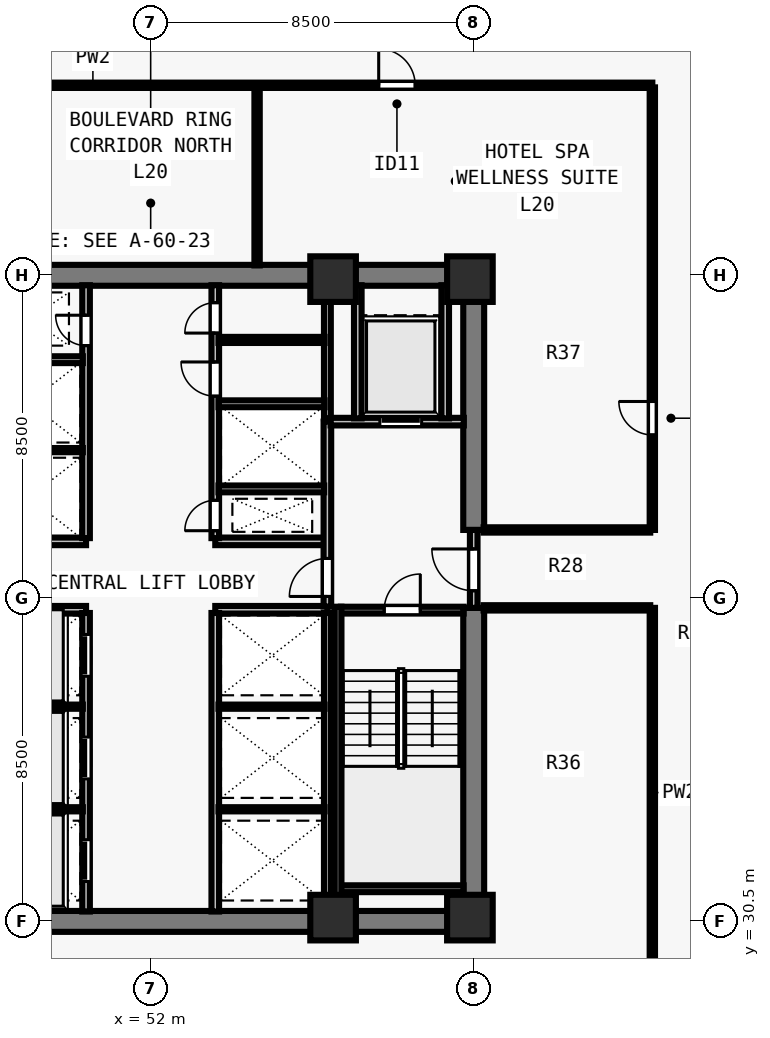
"""IFC4 building model, lengths in metres.
Left out: names, types, materials, properties, quantities, classifications, styles, units other than length and angle.
Written with IfcOpenShell. Run it as: python <this file> out.ifc"""

import sys

from ifc_helpers import new_model, si_unit, direction, frame, frame_2d, origin, origin_2d, place, context, subcontext, project, spatial, rectangle, extrude, element, fill, save


model = new_model("IFC4")
c1 = context("Model", 3, precision=1e-05, world=origin(), true_north=direction((0.0, 1.0)))
c2 = subcontext(c1, "Body", "Model", "MODEL_VIEW")
j1 = project(units=[si_unit("LENGTHUNIT", "METRE"), si_unit("PLANEANGLEUNIT", "RADIAN")], contexts=[c1])
p1 = place(None, origin())
s1 = spatial("IfcSite", under=j1, at=p1, CompositionType="ELEMENT")
p2 = place(p1, origin())
s2 = spatial("IfcBuilding", under=s1, at=p2, CompositionType="ELEMENT")
p3 = place(p2, frame((0.0, 0.0, 76.0)))
s3 = spatial("IfcBuildingStorey", under=s2, at=p3, CompositionType="ELEMENT", Elevation=76.0)
for number, where, z_axis, x_axis in (
    (1, (56.8, 30.6, 0.0), (0.0, 0.0, 1.0), (1.0, 0.0, 0.0)),
    (2, (60.4, 30.6, 0.0), (0.0, 0.0, 1.0), (1.0, 0.0, 0.0)),
    (3, (56.8, 47.4, 0.0), (0.0, 0.0, 1.0), (1.0, 0.0, 0.0)),
    (4, (60.4, 47.4, 0.0), (0.0, 0.0, 1.0), (1.0, 0.0, 0.0)),
):
    element("IfcColumn", number, at=place(p3, frame(where, z_axis=z_axis, x_axis=x_axis)), inside=s3, PredefinedType="COLUMN", context=c2, shape_type="SweptSolid", body=[
        extrude(rectangle(XDim=1.2, YDim=1.2, at=origin_2d()), origin(), (0.0, 0.0, 1.0), 3.5),
    ])
for number, where, z_axis, x_axis in (
    (5, (43.225, 30.5, 0.0), (0.0, 0.0, 1.0), (1.0, 0.0, 0.0)),
    (6, (43.225, 47.5, 0.0), (0.0, 0.0, 1.0), (1.0, 0.0, 0.0)),
):
    element("IfcWall", number, at=place(p3, frame(where, z_axis=z_axis, x_axis=x_axis)), inside=s3, PredefinedType="SHEAR", context=c2, shape_type="SweptSolid", body=[
        extrude(rectangle(XDim=17.55, YDim=0.55, at=frame_2d((8.775, 0.0))), origin(), (0.0, 0.0, 1.0), 3.28),
    ])
p4 = place(p3, frame((60.5, 30.765, 0.0), z_axis=(0.0, 0.0, 1.0), x_axis=(0.0, 1.0, 0.0)))
e7 = element("IfcWall", 7, at=p4, inside=s3, PredefinedType="SHEAR", context=c2, shape_type="SweptSolid", body=[
    extrude(rectangle(XDim=7.985, YDim=0.55, at=frame_2d((3.993, 0.0))), origin(), (0.0, 0.0, 1.0), 3.28),
])
p5 = place(p3, frame((60.5, 40.8, 0.0), z_axis=(0.0, 0.0, 1.0), x_axis=(0.0, 1.0, 0.0)))
e8 = element("IfcWall", 8, at=p5, inside=s3, PredefinedType="SHEAR", context=c2, shape_type="SweptSolid", body=[
    extrude(rectangle(XDim=6.435, YDim=0.55, at=frame_2d((3.218, 0.0))), origin(), (0.0, 0.0, 1.0), 3.28),
])
for number, where, z_axis, x_axis in (
    (9, (47.35, 38.7, 0.0), (0.0, 0.0, 1.0), (1.0, 0.0, 0.0)),
    (10, (47.35, 40.5, 0.0), (0.0, 0.0, 1.0), (1.0, 0.0, 0.0)),
    (11, (53.7, 38.7, 0.0), (0.0, 0.0, 1.0), (1.0, 0.0, 0.0)),
    (12, (53.7, 40.5, 0.0), (0.0, 0.0, 1.0), (1.0, 0.0, 0.0)),
):
    element("IfcWall", number, at=place(p3, frame(where, z_axis=z_axis, x_axis=x_axis)), inside=s3, PredefinedType="SOLIDWALL", context=c2, shape_type="SweptSolid", body=[
        extrude(rectangle(XDim=2.95, YDim=0.2, at=frame_2d((1.475, 0.0))), origin(), (0.0, 0.0, 1.0), 3.28),
    ])
p6 = place(p3, frame((50.3, 30.76, 0.0), z_axis=(0.0, 0.0, 1.0), x_axis=(0.0, 1.0, 0.0)))
e13 = element("IfcWall", 13, at=p6, inside=s3, PredefinedType="SOLIDWALL", context=c2, shape_type="SweptSolid", body=[
    extrude(rectangle(XDim=7.855, YDim=0.2, at=frame_2d((3.927, 0.0))), origin(), (0.0, 0.0, 1.0), 3.28),
])
p7 = place(p6, frame((0.79, 0.0, 0.0)))
e14 = element("IfcOpeningElement", 14, at=p7, cuts=e13, PredefinedType="OPENING", context=c2, shape_type="SweptSolid", body=[
    extrude(rectangle(XDim=1.1, YDim=2.2, at=frame_2d((0.55, 1.1))), frame((0.0, 0.11, 0.0), z_axis=(0.0, -1.0, 0.0), x_axis=(1.0, 0.0, 0.0)), (0.0, 0.0, 1.0), 0.22),
])
p8 = place(p6, frame((3.49, 0.0, 0.0)))
e15 = element("IfcOpeningElement", 15, at=p8, cuts=e13, PredefinedType="OPENING", context=c2, shape_type="SweptSolid", body=[
    extrude(rectangle(XDim=1.1, YDim=2.2, at=frame_2d((0.55, 1.1))), frame((0.0, 0.11, 0.0), z_axis=(0.0, -1.0, 0.0), x_axis=(1.0, 0.0, 0.0)), (0.0, 0.0, 1.0), 0.22),
])
p9 = place(p6, frame((6.19, 0.0, 0.0)))
e16 = element("IfcOpeningElement", 16, at=p9, cuts=e13, PredefinedType="OPENING", context=c2, shape_type="SweptSolid", body=[
    extrude(rectangle(XDim=1.1, YDim=2.2, at=frame_2d((0.55, 1.1))), frame((0.0, 0.11, 0.0), z_axis=(0.0, -1.0, 0.0), x_axis=(1.0, 0.0, 0.0)), (0.0, 0.0, 1.0), 0.22),
])
p10 = place(p3, frame((53.7, 30.76, 0.0), z_axis=(0.0, 0.0, 1.0), x_axis=(0.0, 1.0, 0.0)))
e17 = element("IfcWall", 17, at=p10, inside=s3, PredefinedType="SOLIDWALL", context=c2, shape_type="SweptSolid", body=[
    extrude(rectangle(XDim=7.855, YDim=0.2, at=frame_2d((3.927, 0.0))), origin(), (0.0, 0.0, 1.0), 3.28),
])
p11 = place(p3, frame((50.3, 40.585, 0.0), z_axis=(0.0, 0.0, 1.0), x_axis=(0.0, 1.0, 0.0)))
e18 = element("IfcWall", 18, at=p11, inside=s3, PredefinedType="SOLIDWALL", context=c2, shape_type="SweptSolid", body=[
    extrude(rectangle(XDim=6.655, YDim=0.2, at=frame_2d((3.328, 0.0))), origin(), (0.0, 0.0, 1.0), 3.28),
])
p12 = place(p11, frame((5.065, 0.0, 0.0)))
e19 = element("IfcOpeningElement", 19, at=p12, cuts=e18, PredefinedType="OPENING", context=c2, shape_type="SweptSolid", body=[
    extrude(rectangle(XDim=0.8, YDim=2.08, at=frame_2d((0.4, 1.04))), frame((0.0, 0.11, 0.0), z_axis=(0.0, -1.0, 0.0), x_axis=(1.0, 0.0, 0.0)), (0.0, 0.0, 1.0), 0.22),
])
p13 = place(p3, frame((53.7, 40.585, 0.0), z_axis=(0.0, 0.0, 1.0), x_axis=(0.0, 1.0, 0.0)))
e20 = element("IfcWall", 20, at=p13, inside=s3, PredefinedType="SOLIDWALL", context=c2, shape_type="SweptSolid", body=[
    extrude(rectangle(XDim=6.655, YDim=0.2, at=frame_2d((3.328, 0.0))), origin(), (0.0, 0.0, 1.0), 3.28),
])
p14 = place(p13, frame((0.195, 0.0, 0.0)))
e21 = element("IfcOpeningElement", 21, at=p14, cuts=e20, PredefinedType="OPENING", context=c2, shape_type="SweptSolid", body=[
    extrude(rectangle(XDim=0.8, YDim=2.08, at=frame_2d((0.4, 1.04))), frame((0.0, 0.11, 0.0), z_axis=(0.0, -1.0, 0.0), x_axis=(1.0, 0.0, 0.0)), (0.0, 0.0, 1.0), 0.22),
])
p15 = place(p13, frame((3.735, 0.0, 0.0)))
e22 = element("IfcOpeningElement", 22, at=p15, cuts=e20, PredefinedType="OPENING", context=c2, shape_type="SweptSolid", body=[
    extrude(rectangle(XDim=0.9, YDim=2.12, at=frame_2d((0.45, 1.06))), frame((0.0, 0.11, 0.0), z_axis=(0.0, -1.0, 0.0), x_axis=(1.0, 0.0, 0.0)), (0.0, 0.0, 1.0), 0.22),
])
p16 = place(p13, frame((5.395, 0.0, 0.0)))
e23 = element("IfcOpeningElement", 23, at=p16, cuts=e20, PredefinedType="OPENING", context=c2, shape_type="SweptSolid", body=[
    extrude(rectangle(XDim=0.8, YDim=2.1, at=frame_2d((0.4, 1.05))), frame((0.0, 0.11, 0.0), z_axis=(0.0, -1.0, 0.0), x_axis=(1.0, 0.0, 0.0)), (0.0, 0.0, 1.0), 0.22),
])
p17 = place(p3, frame((60.5, 38.75, 0.0), z_axis=(0.0, 0.0, 1.0), x_axis=(0.0, 1.0, 0.0)))
e24 = element("IfcWall", 24, at=p17, inside=s3, PredefinedType="SOLIDWALL", context=c2, shape_type="SweptSolid", body=[
    extrude(rectangle(XDim=2.05, YDim=0.2, at=frame_2d((1.025, 0.0))), origin(), (0.0, 0.0, 1.0), 3.28),
])
p18 = place(p17, frame((0.45, 0.0, 0.0)))
e25 = element("IfcOpeningElement", 25, at=p18, cuts=e24, PredefinedType="OPENING", context=c2, shape_type="SweptSolid", body=[
    extrude(rectangle(XDim=1.1, YDim=2.15, at=frame_2d((0.55, 1.075))), frame((0.0, 0.11, 0.0), z_axis=(0.0, -1.0, 0.0), x_axis=(1.0, 0.0, 0.0)), (0.0, 0.0, 1.0), 0.22),
])
p19 = place(p3, frame((56.65, 38.785, 0.0), z_axis=(0.0, 0.0, 1.0), x_axis=(0.0, 1.0, 0.0)))
e26 = element("IfcWall", 26, at=p19, inside=s3, PredefinedType="SOLIDWALL", context=c2, shape_type="SweptSolid", body=[
    extrude(rectangle(XDim=4.865, YDim=0.2, at=frame_2d((2.433, 0.0))), origin(), (0.0, 0.0, 1.0), 3.28),
])
p20 = place(p19, frame((0.265, 0.0, 0.0)))
e27 = element("IfcOpeningElement", 27, at=p20, cuts=e26, PredefinedType="OPENING", context=c2, shape_type="SweptSolid", body=[
    extrude(rectangle(XDim=1.0, YDim=2.15, at=frame_2d((0.5, 1.075))), frame((0.0, 0.11, 0.0), z_axis=(0.0, -1.0, 0.0), x_axis=(1.0, 0.0, 0.0)), (0.0, 0.0, 1.0), 0.22),
])
p21 = place(p3, frame((56.735, 43.65, 0.0), z_axis=(0.0, 0.0, 1.0), x_axis=(1.0, 0.0, 0.0)))
e28 = element("IfcWall", 28, at=p21, inside=s3, PredefinedType="SOLIDWALL", context=c2, shape_type="SweptSolid", body=[
    extrude(rectangle(XDim=3.505, YDim=0.2, at=frame_2d((1.752, 0.0))), origin(), (0.0, 0.0, 1.0), 3.28),
])
p22 = place(p21, frame((1.295, 0.0, 0.0)))
e29 = element("IfcOpeningElement", 29, at=p22, cuts=e28, PredefinedType="OPENING", context=c2, shape_type="SweptSolid", body=[
    extrude(rectangle(XDim=1.1, YDim=2.2, at=frame_2d((0.55, 1.1))), frame((0.0, 0.11, 0.0), z_axis=(0.0, -1.0, 0.0), x_axis=(1.0, 0.0, 0.0)), (0.0, 0.0, 1.0), 0.22),
])
for number, where, z_axis, x_axis in (
    (30, (57.45, 43.735, 0.0), (0.0, 0.0, 1.0), (0.0, 1.0, 0.0)),
    (31, (59.75, 43.735, 0.0), (0.0, 0.0, 1.0), (0.0, 1.0, 0.0)),
):
    element("IfcWall", number, at=place(p3, frame(where, z_axis=z_axis, x_axis=x_axis)), inside=s3, PredefinedType="SOLIDWALL", context=c2, shape_type="SweptSolid", body=[
        extrude(rectangle(XDim=3.505, YDim=0.2, at=frame_2d((1.752, 0.0))), origin(), (0.0, 0.0, 1.0), 3.28),
    ])
for number, where, z_axis, x_axis in (
    (32, (47.425, 33.45, 0.0), (0.0, 0.0, 1.0), (1.0, 0.0, 0.0)),
    (33, (47.425, 36.15, 0.0), (0.0, 0.0, 1.0), (1.0, 0.0, 0.0)),
):
    element("IfcWall", number, at=place(p3, frame(where, z_axis=z_axis, x_axis=x_axis)), inside=s3, PredefinedType="PARTITIONING", context=c2, shape_type="SweptSolid", body=[
        extrude(rectangle(XDim=2.79, YDim=0.11, at=frame_2d((1.395, 0.0))), origin(), (0.0, 0.0, 1.0), 3.28),
    ])
p23 = place(p3, frame((56.65, 30.76, 0.0), z_axis=(0.0, 0.0, 1.0), x_axis=(0.0, 1.0, 0.0)))
e34 = element("IfcWall", 34, at=p23, inside=s3, PredefinedType="SOLIDWALL", context=c2, shape_type="SweptSolid", body=[
    extrude(rectangle(XDim=7.855, YDim=0.18, at=frame_2d((3.927, 0.0))), origin(), (0.0, 0.0, 1.0), 3.28),
])
for number, where, z_axis, x_axis in (
    (35, (53.785, 33.45, 0.0), (0.0, 0.0, 1.0), (1.0, 0.0, 0.0)),
    (36, (53.785, 36.15, 0.0), (0.0, 0.0, 1.0), (1.0, 0.0, 0.0)),
):
    element("IfcWall", number, at=place(p3, frame(where, z_axis=z_axis, x_axis=x_axis)), inside=s3, PredefinedType="PARTITIONING", context=c2, shape_type="SweptSolid", body=[
        extrude(rectangle(XDim=2.79, YDim=0.11, at=frame_2d((1.395, 0.0))), origin(), (0.0, 0.0, 1.0), 3.28),
    ])
p24 = place(p3, frame((47.435, 42.9, 0.0), z_axis=(0.0, 0.0, 1.0), x_axis=(1.0, 0.0, 0.0)))
e37 = element("IfcWall", 37, at=p24, inside=s3, PredefinedType="PARTITIONING", context=c2, shape_type="SweptSolid", body=[
    extrude(rectangle(XDim=2.78, YDim=0.11, at=frame_2d((1.39, 0.0))), origin(), (0.0, 0.0, 1.0), 3.28),
])
p25 = place(p3, frame((47.425, 45.28, 0.0), z_axis=(0.0, 0.0, 1.0), x_axis=(1.0, 0.0, 0.0)))
e38 = element("IfcWall", 38, at=p25, inside=s3, PredefinedType="SOLIDWALL", context=c2, shape_type="SweptSolid", body=[
    extrude(rectangle(XDim=2.79, YDim=0.18, at=frame_2d((1.395, 0.0))), origin(), (0.0, 0.0, 1.0), 3.28),
])
p26 = place(p3, frame((56.65, 43.735, 0.0), z_axis=(0.0, 0.0, 1.0), x_axis=(0.0, 1.0, 0.0)))
e39 = element("IfcWall", 39, at=p26, inside=s3, PredefinedType="SOLIDWALL", context=c2, shape_type="SweptSolid", body=[
    extrude(rectangle(XDim=3.505, YDim=0.18, at=frame_2d((1.752, 0.0))), origin(), (0.0, 0.0, 1.0), 3.28),
])
p27 = place(p3, frame((53.785, 41.88, 0.0), z_axis=(0.0, 0.0, 1.0), x_axis=(1.0, 0.0, 0.0)))
e40 = element("IfcWall", 40, at=p27, inside=s3, PredefinedType="SOLIDWALL", context=c2, shape_type="SweptSolid", body=[
    extrude(rectangle(XDim=2.78, YDim=0.18, at=frame_2d((1.39, 0.0))), origin(), (0.0, 0.0, 1.0), 3.28),
])
p28 = place(p3, frame((53.785, 44.12, 0.0), z_axis=(0.0, 0.0, 1.0), x_axis=(1.0, 0.0, 0.0)))
e41 = element("IfcWall", 41, at=p28, inside=s3, PredefinedType="SOLIDWALL", context=c2, shape_type="SweptSolid", body=[
    extrude(rectangle(XDim=2.79, YDim=0.18, at=frame_2d((1.395, 0.0))), origin(), (0.0, 0.0, 1.0), 3.28),
])
p29 = place(p3, frame((53.785, 45.8, 0.0), z_axis=(0.0, 0.0, 1.0), x_axis=(1.0, 0.0, 0.0)))
e42 = element("IfcWall", 42, at=p29, inside=s3, PredefinedType="PARTITIONING", context=c2, shape_type="SweptSolid", body=[
    extrude(rectangle(XDim=2.79, YDim=0.16, at=frame_2d((1.395, 0.0))), origin(), (0.0, 0.0, 1.0), 3.28),
])
p30 = place(p3, frame((38.8, 52.5, 0.0), z_axis=(0.0, 0.0, 1.0), x_axis=(1.0, 0.0, 0.0)))
e43 = element("IfcWall", 43, at=p30, inside=s3, PredefinedType="PARTITIONING", context=c2, shape_type="SweptSolid", body=[
    extrude(rectangle(XDim=26.4, YDim=0.14, at=frame_2d((13.2, 0.0))), origin(), (0.0, 0.0, 1.0), 3.28),
])
p31 = place(p30, frame((3.2, 0.0, 0.0)))
e44 = element("IfcOpeningElement", 44, at=p31, cuts=e43, PredefinedType="OPENING", context=c2, shape_type="SweptSolid", body=[
    extrude(rectangle(XDim=0.96, YDim=2.12, at=frame_2d((0.48, 1.06))), frame((0.0, 0.08, 0.0), z_axis=(0.0, -1.0, 0.0), x_axis=(1.0, 0.0, 0.0)), (0.0, 0.0, 1.0), 0.16),
])
p32 = place(p30, frame((19.2, 0.0, 0.0)))
e45 = element("IfcOpeningElement", 45, at=p32, cuts=e43, PredefinedType="OPENING", context=c2, shape_type="SweptSolid", body=[
    extrude(rectangle(XDim=0.96, YDim=2.12, at=frame_2d((0.48, 1.06))), frame((0.0, 0.08, 0.0), z_axis=(0.0, -1.0, 0.0), x_axis=(1.0, 0.0, 0.0)), (0.0, 0.0, 1.0), 0.16),
])
p33 = place(p3, frame((65.2, 25.555, 0.0), z_axis=(0.0, 0.0, 1.0), x_axis=(0.0, 1.0, 0.0)))
e46 = element("IfcWall", 46, at=p33, inside=s3, PredefinedType="PARTITIONING", context=c2, shape_type="SweptSolid", body=[
    extrude(rectangle(XDim=13.195, YDim=0.14, at=frame_2d((6.598, 0.0))), origin(), (0.0, 0.0, 1.0), 3.28),
])
p34 = place(p33, frame((2.445, 0.0, 0.0)))
e47 = element("IfcOpeningElement", 47, at=p34, cuts=e46, PredefinedType="OPENING", context=c2, shape_type="SweptSolid", body=[
    extrude(rectangle(XDim=0.88, YDim=2.1, at=frame_2d((0.44, 1.05))), frame((0.0, 0.08, 0.0), z_axis=(0.0, -1.0, 0.0), x_axis=(1.0, 0.0, 0.0)), (0.0, 0.0, 1.0), 0.16),
])
p35 = place(p3, frame((65.2, 40.8, 0.0), z_axis=(0.0, 0.0, 1.0), x_axis=(0.0, 1.0, 0.0)))
e48 = element("IfcWall", 48, at=p35, inside=s3, PredefinedType="PARTITIONING", context=c2, shape_type="SweptSolid", body=[
    extrude(rectangle(XDim=11.645, YDim=0.14, at=frame_2d((5.823, 0.0))), origin(), (0.0, 0.0, 1.0), 3.28),
])
p36 = place(p35, frame((2.5, 0.0, 0.0)))
e49 = element("IfcOpeningElement", 49, at=p36, cuts=e48, PredefinedType="OPENING", context=c2, shape_type="SweptSolid", body=[
    extrude(rectangle(XDim=0.88, YDim=2.1, at=frame_2d((0.44, 1.05))), frame((0.0, 0.08, 0.0), z_axis=(0.0, -1.0, 0.0), x_axis=(1.0, 0.0, 0.0)), (0.0, 0.0, 1.0), 0.16),
])
for number, where, z_axis, x_axis in (
    (50, (60.76, 38.75, 0.0), (0.0, 0.0, 1.0), (1.0, 0.0, 0.0)),
    (51, (60.76, 40.8, 0.0), (0.0, 0.0, 1.0), (1.0, 0.0, 0.0)),
):
    element("IfcWall", number, at=place(p3, frame(where, z_axis=z_axis, x_axis=x_axis)), inside=s3, PredefinedType="PARTITIONING", context=c2, shape_type="SweptSolid", body=[
        extrude(rectangle(XDim=4.385, YDim=0.14, at=frame_2d((2.192, 0.0))), origin(), (0.0, 0.0, 1.0), 3.28),
    ])
p37 = place(p3, frame((54.8, 47.76, 0.0), z_axis=(0.0, 0.0, 1.0), x_axis=(0.0, 1.0, 0.0)))
e52 = element("IfcWall", 52, at=p37, inside=s3, PredefinedType="PARTITIONING", context=c2, shape_type="SweptSolid", body=[
    extrude(rectangle(XDim=4.685, YDim=0.14, at=frame_2d((2.343, 0.0))), origin(), (0.0, 0.0, 1.0), 3.28),
])
p38 = place(p3, frame((57.005, 38.69, 0.0), z_axis=(0.0, 0.0, 1.0), x_axis=(1.0, 0.0, 0.0)))
e53 = element("IfcWall", 53, at=p38, inside=s3, PredefinedType="SOLIDWALL", context=c2, shape_type="SweptSolid", body=[
    extrude(rectangle(XDim=3.23, YDim=0.18, at=frame_2d((1.615, 0.0))), origin(), (0.0, 0.0, 1.0), 3.28),
])
p39 = place(p38, frame((1.14, 0.0, 0.0)))
e54 = element("IfcOpeningElement", 54, at=p39, cuts=e53, PredefinedType="OPENING", context=c2, shape_type="SweptSolid", body=[
    extrude(rectangle(XDim=0.95, YDim=2.15, at=frame_2d((0.475, 1.075))), frame((0.0, 0.1, 0.0), z_axis=(0.0, -1.0, 0.0), x_axis=(1.0, 0.0, 0.0)), (0.0, 0.0, 1.0), 0.2),
])
p40 = place(p3, frame((57.005, 31.36, 0.0), z_axis=(0.0, 0.0, 1.0), x_axis=(1.0, 0.0, 0.0)))
e55 = element("IfcWall", 55, at=p40, inside=s3, PredefinedType="SOLIDWALL", context=c2, shape_type="SweptSolid", body=[
    extrude(rectangle(XDim=3.23, YDim=0.18, at=frame_2d((1.615, 0.0))), origin(), (0.0, 0.0, 1.0), 3.28),
])
p41 = place(p3, frame((56.93, 38.78, 0.0), z_axis=(0.0, 0.0, 1.0), x_axis=(0.0, -1.0, 0.0)))
e56 = element("IfcWall", 56, at=p41, inside=s3, PredefinedType="SOLIDWALL", context=c2, shape_type="SweptSolid", body=[
    extrude(rectangle(XDim=8.017, YDim=0.18, at=frame_2d((4.009, 0.0))), origin(), (0.0, 0.0, 1.0), 3.28),
])
p42 = place(p18, origin())
e57 = element("IfcDoor", 57, at=p42, inside=s3, OperationType="SINGLE_SWING_RIGHT", PredefinedType="DOOR", context=c2, shape_type="SweptSolid", body=[
    extrude(rectangle(XDim=1.1, YDim=2.15, at=frame_2d((0.55, 1.075))), frame((0.0, 0.025, 0.0), z_axis=(0.0, -1.0, 0.0), x_axis=(1.0, 0.0, 0.0)), (0.0, 0.0, 1.0), 0.05),
])
fill(e25, e57)
p43 = place(p20, origin())
e58 = element("IfcDoor", 58, at=p43, inside=s3, OperationType="SINGLE_SWING_LEFT", PredefinedType="DOOR", context=c2, shape_type="SweptSolid", body=[
    extrude(rectangle(XDim=1.0, YDim=2.15, at=frame_2d((0.5, 1.075))), frame((0.0, 0.025, 0.0), z_axis=(0.0, -1.0, 0.0), x_axis=(1.0, 0.0, 0.0)), (0.0, 0.0, 1.0), 0.05),
])
fill(e27, e58)
p44 = place(p22, origin())
e59 = element("IfcDoor", 59, at=p44, inside=s3, OperationType="SLIDING_TO_LEFT", PredefinedType="DOOR", context=c2, shape_type="SweptSolid", body=[
    extrude(rectangle(XDim=1.1, YDim=2.2, at=frame_2d((0.55, 1.1))), frame((0.0, 0.025, 0.0), z_axis=(0.0, -1.0, 0.0), x_axis=(1.0, 0.0, 0.0)), (0.0, 0.0, 1.0), 0.05),
])
fill(e29, e59)
p45 = place(p7, origin())
e60 = element("IfcDoor", 60, at=p45, inside=s3, OperationType="SLIDING_TO_LEFT", PredefinedType="DOOR", context=c2, shape_type="SweptSolid", body=[
    extrude(rectangle(XDim=1.1, YDim=2.2, at=frame_2d((0.55, 1.1))), frame((0.0, 0.025, 0.0), z_axis=(0.0, -1.0, 0.0), x_axis=(1.0, 0.0, 0.0)), (0.0, 0.0, 1.0), 0.05),
])
fill(e14, e60)
p46 = place(p8, origin())
e61 = element("IfcDoor", 61, at=p46, inside=s3, OperationType="SLIDING_TO_LEFT", PredefinedType="DOOR", context=c2, shape_type="SweptSolid", body=[
    extrude(rectangle(XDim=1.1, YDim=2.2, at=frame_2d((0.55, 1.1))), frame((0.0, 0.025, 0.0), z_axis=(0.0, -1.0, 0.0), x_axis=(1.0, 0.0, 0.0)), (0.0, 0.0, 1.0), 0.05),
])
fill(e15, e61)
p47 = place(p9, origin())
e62 = element("IfcDoor", 62, at=p47, inside=s3, OperationType="SLIDING_TO_LEFT", PredefinedType="DOOR", context=c2, shape_type="SweptSolid", body=[
    extrude(rectangle(XDim=1.1, YDim=2.2, at=frame_2d((0.55, 1.1))), frame((0.0, 0.025, 0.0), z_axis=(0.0, -1.0, 0.0), x_axis=(1.0, 0.0, 0.0)), (0.0, 0.0, 1.0), 0.05),
])
fill(e16, e62)
p48 = place(p12, origin())
e63 = element("IfcDoor", 63, at=p48, inside=s3, OperationType="SINGLE_SWING_RIGHT", PredefinedType="DOOR", context=c2, shape_type="SweptSolid", body=[
    extrude(rectangle(XDim=0.8, YDim=2.08, at=frame_2d((0.4, 1.04))), frame((0.0, 0.025, 0.0), z_axis=(0.0, -1.0, 0.0), x_axis=(1.0, 0.0, 0.0)), (0.0, 0.0, 1.0), 0.05),
])
fill(e19, e63)
p49 = place(p14, origin())
e64 = element("IfcDoor", 64, at=p49, inside=s3, OperationType="SINGLE_SWING_LEFT", PredefinedType="DOOR", context=c2, shape_type="SweptSolid", body=[
    extrude(rectangle(XDim=0.8, YDim=2.08, at=frame_2d((0.4, 1.04))), frame((0.0, 0.025, 0.0), z_axis=(0.0, -1.0, 0.0), x_axis=(1.0, 0.0, 0.0)), (0.0, 0.0, 1.0), 0.05),
])
fill(e21, e64)
p50 = place(p15, origin())
e65 = element("IfcDoor", 65, at=p50, inside=s3, OperationType="SINGLE_SWING_RIGHT", PredefinedType="DOOR", context=c2, shape_type="SweptSolid", body=[
    extrude(rectangle(XDim=0.9, YDim=2.12, at=frame_2d((0.45, 1.06))), frame((0.0, 0.025, 0.0), z_axis=(0.0, -1.0, 0.0), x_axis=(1.0, 0.0, 0.0)), (0.0, 0.0, 1.0), 0.05),
])
fill(e22, e65)
p51 = place(p16, origin())
e66 = element("IfcDoor", 66, at=p51, inside=s3, OperationType="SINGLE_SWING_LEFT", PredefinedType="DOOR", context=c2, shape_type="SweptSolid", body=[
    extrude(rectangle(XDim=0.8, YDim=2.1, at=frame_2d((0.4, 1.05))), frame((0.0, 0.025, 0.0), z_axis=(0.0, -1.0, 0.0), x_axis=(1.0, 0.0, 0.0)), (0.0, 0.0, 1.0), 0.05),
])
fill(e23, e66)
p52 = place(p32, origin())
e67 = element("IfcDoor", 67, at=p52, inside=s3, OperationType="SINGLE_SWING_LEFT", PredefinedType="DOOR", context=c2, shape_type="SweptSolid", body=[
    extrude(rectangle(XDim=0.96, YDim=2.12, at=frame_2d((0.48, 1.06))), frame((0.0, 0.025, 0.0), z_axis=(0.0, -1.0, 0.0), x_axis=(1.0, 0.0, 0.0)), (0.0, 0.0, 1.0), 0.05),
])
fill(e45, e67)
p53 = place(p36, origin())
e68 = element("IfcDoor", 68, at=p53, inside=s3, OperationType="SINGLE_SWING_RIGHT", PredefinedType="DOOR", context=c2, shape_type="SweptSolid", body=[
    extrude(rectangle(XDim=0.88, YDim=2.1, at=frame_2d((0.44, 1.05))), frame((0.0, 0.025, 0.0), z_axis=(0.0, -1.0, 0.0), x_axis=(1.0, 0.0, 0.0)), (0.0, 0.0, 1.0), 0.05),
])
fill(e49, e68)
p54 = place(p39, origin())
e69 = element("IfcDoor", 69, at=p54, inside=s3, OperationType="SINGLE_SWING_RIGHT", PredefinedType="DOOR", context=c2, shape_type="SweptSolid", body=[
    extrude(rectangle(XDim=0.95, YDim=2.15, at=frame_2d((0.475, 1.075))), frame((0.0, 0.025, 0.0), z_axis=(0.0, -1.0, 0.0), x_axis=(1.0, 0.0, 0.0)), (0.0, 0.0, 1.0), 0.05),
])
fill(e54, e69)
save(model, sys.argv[1])
